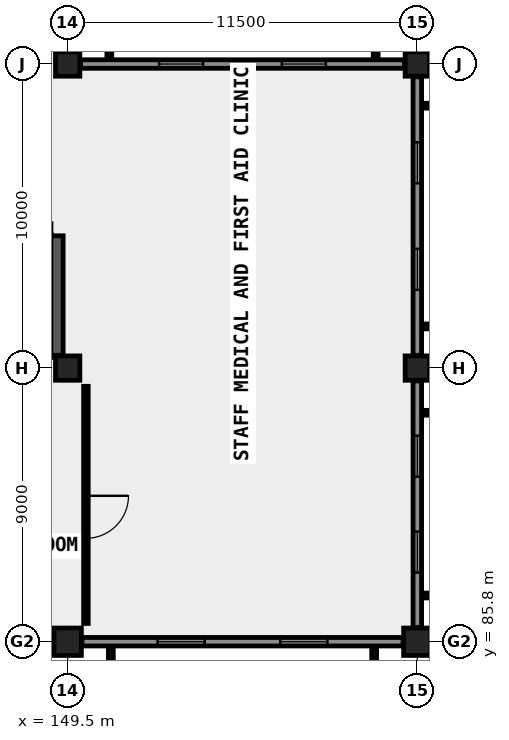
"""IFC4 building model, lengths in metres.
Left out: names, types, materials, properties, quantities, classifications, styles, units other than length and angle.
Written with IfcOpenShell. Run it as: python <this file> out.ifc"""

import sys

from ifc_helpers import new_model, si_unit, direction, frame, frame_2d, origin, origin_2d, place, context, subcontext, project, spatial, rectangle, extrude, element, fill, save


model = new_model("IFC4")
c1 = context("Model", 3, precision=1e-05, world=origin(), true_north=direction((0.0, 1.0)))
c2 = subcontext(c1, "Body", "Model", "MODEL_VIEW")
j1 = project(units=[si_unit("LENGTHUNIT", "METRE"), si_unit("PLANEANGLEUNIT", "RADIAN")], contexts=[c1])
p1 = place(None, origin())
s1 = spatial("IfcSite", under=j1, at=p1, CompositionType="ELEMENT")
p2 = place(p1, origin())
s2 = spatial("IfcBuilding", under=s1, at=p2, CompositionType="ELEMENT")
p3 = place(p2, frame((0.0, 0.0, 18.3)))
s3 = spatial("IfcBuildingStorey", under=s2, at=p3, CompositionType="ELEMENT", Elevation=18.3)
p4 = place(p3, frame((149.5, 85.8, 0.0), z_axis=(0.0, 0.0, 1.0), x_axis=(1.0, 0.0, 0.0)))
e1 = element("IfcColumn", 1, at=p4, inside=s3, PredefinedType="COLUMN", context=c2, shape_type="SweptSolid", body=[
    extrude(rectangle(XDim=0.9, YDim=0.9, at=origin_2d()), origin(), (0.0, 0.0, 1.0), 4.16),
])
for number, where, z_axis, x_axis in (
    (2, (149.5, 94.8, 0.0), (0.0, 0.0, 1.0), (1.0, 0.0, 0.0)),
    (3, (149.5, 104.8, 0.0), (0.0, 0.0, 1.0), (1.0, 0.0, 0.0)),
):
    element("IfcColumn", number, at=place(p3, frame(where, z_axis=z_axis, x_axis=x_axis)), inside=s3, PredefinedType="COLUMN", context=c2, shape_type="SweptSolid", body=[
        extrude(rectangle(XDim=0.8, YDim=0.8, at=origin_2d()), origin(), (0.0, 0.0, 1.0), 4.16),
    ])
p5 = place(p3, frame((161.0, 85.8, 0.0), z_axis=(0.0, 0.0, 1.0), x_axis=(1.0, 0.0, 0.0)))
e4 = element("IfcColumn", 4, at=p5, inside=s3, PredefinedType="COLUMN", context=c2, shape_type="SweptSolid", body=[
    extrude(rectangle(XDim=0.9, YDim=0.9, at=origin_2d()), origin(), (0.0, 0.0, 1.0), 4.16),
])
for number, where, z_axis, x_axis in (
    (5, (161.0, 94.8, 0.0), (0.0, 0.0, 1.0), (1.0, 0.0, 0.0)),
    (6, (161.0, 104.8, 0.0), (0.0, 0.0, 1.0), (1.0, 0.0, 0.0)),
):
    element("IfcColumn", number, at=place(p3, frame(where, z_axis=z_axis, x_axis=x_axis)), inside=s3, PredefinedType="COLUMN", context=c2, shape_type="SweptSolid", body=[
        extrude(rectangle(XDim=0.8, YDim=0.8, at=origin_2d()), origin(), (0.0, 0.0, 1.0), 4.16),
    ])
p6 = place(p3, frame((149.15, 95.22, 0.0), z_axis=(0.0, 0.0, 1.0), x_axis=(0.0, 1.0, 0.0)))
e7 = element("IfcWall", 7, at=p6, inside=s3, PredefinedType="SHEAR", context=c2, shape_type="SweptSolid", body=[
    extrude(rectangle(XDim=3.93, YDim=0.4, at=frame_2d((1.965, 0.0))), origin(), (0.0, 0.0, 1.0), 4.16),
])
p7 = place(p3, frame((148.68, 85.8, 0.0), z_axis=(0.0, 0.0, 1.0), x_axis=(1.0, 0.0, 0.0)))
e8 = element("IfcWall", 8, at=p7, inside=s3, PredefinedType="SOLIDWALL", context=c2, shape_type="SweptSolid", body=[
    extrude(rectangle(XDim=0.35, YDim=0.28, at=frame_2d((0.175, 0.0))), origin(), (0.0, 0.0, 1.0), 3.89),
])
p8 = place(p3, frame((149.97, 85.8, 0.0), z_axis=(0.0, 0.0, 1.0), x_axis=(1.0, 0.0, 0.0)))
e9 = element("IfcWall", 9, at=p8, inside=s3, PredefinedType="SOLIDWALL", context=c2, shape_type="SweptSolid", body=[
    extrude(rectangle(XDim=10.56, YDim=0.28, at=frame_2d((5.28, 0.0))), origin(), (0.0, 0.0, 1.0), 3.1),
])
p9 = place(p8, frame((2.487, 0.0, 0.85)))
e10 = element("IfcOpeningElement", 10, at=p9, cuts=e9, PredefinedType="OPENING", context=c2, shape_type="SweptSolid", body=[
    extrude(rectangle(XDim=1.55, YDim=1.85, at=frame_2d((0.775, 0.925))), frame((0.0, 0.15, 0.0), z_axis=(0.0, -1.0, 0.0), x_axis=(1.0, 0.0, 0.0)), (0.0, 0.0, 1.0), 0.3),
])
p10 = place(p8, frame((6.523, 0.0, 0.85)))
e11 = element("IfcOpeningElement", 11, at=p10, cuts=e9, PredefinedType="OPENING", context=c2, shape_type="SweptSolid", body=[
    extrude(rectangle(XDim=1.55, YDim=1.85, at=frame_2d((0.775, 0.925))), frame((0.0, 0.15, 0.0), z_axis=(0.0, -1.0, 0.0), x_axis=(1.0, 0.0, 0.0)), (0.0, 0.0, 1.0), 0.3),
])
p11 = place(p3, frame((161.0, 86.27, 0.0), z_axis=(0.0, 0.0, 1.0), x_axis=(0.0, 1.0, 0.0)))
e12 = element("IfcWall", 12, at=p11, inside=s3, PredefinedType="SOLIDWALL", context=c2, shape_type="SweptSolid", body=[
    extrude(rectangle(XDim=8.11, YDim=0.28, at=frame_2d((4.055, 0.0))), origin(), (0.0, 0.0, 1.0), 3.1),
])
p12 = place(p11, frame((1.803, 0.0, 0.85)))
e13 = element("IfcOpeningElement", 13, at=p12, cuts=e12, PredefinedType="OPENING", context=c2, shape_type="SweptSolid", body=[
    extrude(rectangle(XDim=1.35, YDim=1.65, at=frame_2d((0.675, 0.825))), frame((0.0, 0.15, 0.0), z_axis=(0.0, -1.0, 0.0), x_axis=(1.0, 0.0, 0.0)), (0.0, 0.0, 1.0), 0.3),
])
p13 = place(p11, frame((4.957, 0.0, 0.85)))
e14 = element("IfcOpeningElement", 14, at=p13, cuts=e12, PredefinedType="OPENING", context=c2, shape_type="SweptSolid", body=[
    extrude(rectangle(XDim=1.35, YDim=1.65, at=frame_2d((0.675, 0.825))), frame((0.0, 0.15, 0.0), z_axis=(0.0, -1.0, 0.0), x_axis=(1.0, 0.0, 0.0)), (0.0, 0.0, 1.0), 0.3),
])
p14 = place(p3, frame((161.0, 95.22, 0.0), z_axis=(0.0, 0.0, 1.0), x_axis=(0.0, 1.0, 0.0)))
e15 = element("IfcWall", 15, at=p14, inside=s3, PredefinedType="SOLIDWALL", context=c2, shape_type="SweptSolid", body=[
    extrude(rectangle(XDim=9.16, YDim=0.28, at=frame_2d((4.58, 0.0))), origin(), (0.0, 0.0, 1.0), 3.1),
])
p15 = place(p14, frame((2.153, 0.0, 0.85)))
e16 = element("IfcOpeningElement", 16, at=p15, cuts=e15, PredefinedType="OPENING", context=c2, shape_type="SweptSolid", body=[
    extrude(rectangle(XDim=1.35, YDim=1.65, at=frame_2d((0.675, 0.825))), frame((0.0, 0.15, 0.0), z_axis=(0.0, -1.0, 0.0), x_axis=(1.0, 0.0, 0.0)), (0.0, 0.0, 1.0), 0.3),
])
p16 = place(p14, frame((5.657, 0.0, 0.85)))
e17 = element("IfcOpeningElement", 17, at=p16, cuts=e15, PredefinedType="OPENING", context=c2, shape_type="SweptSolid", body=[
    extrude(rectangle(XDim=1.35, YDim=1.65, at=frame_2d((0.675, 0.825))), frame((0.0, 0.15, 0.0), z_axis=(0.0, -1.0, 0.0), x_axis=(1.0, 0.0, 0.0)), (0.0, 0.0, 1.0), 0.3),
])
p17 = place(p3, frame((149.92, 104.8, 0.0), z_axis=(0.0, 0.0, 1.0), x_axis=(1.0, 0.0, 0.0)))
e18 = element("IfcWall", 18, at=p17, inside=s3, PredefinedType="SOLIDWALL", context=c2, shape_type="SweptSolid", body=[
    extrude(rectangle(XDim=10.66, YDim=0.28, at=frame_2d((5.33, 0.0))), origin(), (0.0, 0.0, 1.0), 3.1),
])
p18 = place(p17, frame((2.587, 0.0, 0.85)))
e19 = element("IfcOpeningElement", 19, at=p18, cuts=e18, PredefinedType="OPENING", context=c2, shape_type="SweptSolid", body=[
    extrude(rectangle(XDim=1.45, YDim=1.75, at=frame_2d((0.725, 0.875))), frame((0.0, 0.15, 0.0), z_axis=(0.0, -1.0, 0.0), x_axis=(1.0, 0.0, 0.0)), (0.0, 0.0, 1.0), 0.3),
])
p19 = place(p17, frame((6.623, 0.0, 0.85)))
e20 = element("IfcOpeningElement", 20, at=p19, cuts=e18, PredefinedType="OPENING", context=c2, shape_type="SweptSolid", body=[
    extrude(rectangle(XDim=1.45, YDim=1.75, at=frame_2d((0.725, 0.875))), frame((0.0, 0.15, 0.0), z_axis=(0.0, -1.0, 0.0), x_axis=(1.0, 0.0, 0.0)), (0.0, 0.0, 1.0), 0.3),
])
p20 = place(p3, frame((150.1, 86.4, 0.0), z_axis=(0.0, 0.0, 1.0), x_axis=(0.0, 1.0, 0.0)))
e21 = element("IfcWall", 21, at=p20, inside=s3, PredefinedType="PARTITIONING", context=c2, shape_type="SweptSolid", body=[
    extrude(rectangle(XDim=7.8, YDim=0.15, at=frame_2d((3.9, 0.0))), origin(), (0.0, 0.0, 1.0), 3.88),
])
p21 = place(p20, frame((2.8, 0.0, 0.0)))
e22 = element("IfcOpeningElement", 22, at=p21, cuts=e21, PredefinedType="OPENING", context=c2, shape_type="SweptSolid", body=[
    extrude(rectangle(XDim=1.4, YDim=2.15, at=frame_2d((0.7, 1.075))), frame((0.0, 0.085, 0.0), z_axis=(0.0, -1.0, 0.0), x_axis=(1.0, 0.0, 0.0)), (0.0, 0.0, 1.0), 0.17),
])
p22 = place(p9, origin())
e23 = element("IfcWindow", 23, at=p22, inside=s3, PartitioningType="SINGLE_PANEL", PredefinedType="WINDOW", context=c2, shape_type="SweptSolid", body=[
    extrude(rectangle(XDim=1.55, YDim=1.85, at=frame_2d((0.775, 0.925))), frame((0.0, 0.03, 0.0), z_axis=(0.0, -1.0, 0.0), x_axis=(1.0, 0.0, 0.0)), (0.0, 0.0, 1.0), 0.06),
])
fill(e10, e23)
p23 = place(p10, origin())
e24 = element("IfcWindow", 24, at=p23, inside=s3, PartitioningType="SINGLE_PANEL", PredefinedType="WINDOW", context=c2, shape_type="SweptSolid", body=[
    extrude(rectangle(XDim=1.55, YDim=1.85, at=frame_2d((0.775, 0.925))), frame((0.0, 0.03, 0.0), z_axis=(0.0, -1.0, 0.0), x_axis=(1.0, 0.0, 0.0)), (0.0, 0.0, 1.0), 0.06),
])
fill(e11, e24)
p24 = place(p12, origin())
e25 = element("IfcWindow", 25, at=p24, inside=s3, PartitioningType="SINGLE_PANEL", PredefinedType="WINDOW", context=c2, shape_type="SweptSolid", body=[
    extrude(rectangle(XDim=1.35, YDim=1.65, at=frame_2d((0.675, 0.825))), frame((0.0, 0.03, 0.0), z_axis=(0.0, -1.0, 0.0), x_axis=(1.0, 0.0, 0.0)), (0.0, 0.0, 1.0), 0.06),
])
fill(e13, e25)
p25 = place(p13, origin())
e26 = element("IfcWindow", 26, at=p25, inside=s3, PartitioningType="SINGLE_PANEL", PredefinedType="WINDOW", context=c2, shape_type="SweptSolid", body=[
    extrude(rectangle(XDim=1.35, YDim=1.65, at=frame_2d((0.675, 0.825))), frame((0.0, 0.03, 0.0), z_axis=(0.0, -1.0, 0.0), x_axis=(1.0, 0.0, 0.0)), (0.0, 0.0, 1.0), 0.06),
])
fill(e14, e26)
p26 = place(p15, origin())
e27 = element("IfcWindow", 27, at=p26, inside=s3, PartitioningType="SINGLE_PANEL", PredefinedType="WINDOW", context=c2, shape_type="SweptSolid", body=[
    extrude(rectangle(XDim=1.35, YDim=1.65, at=frame_2d((0.675, 0.825))), frame((0.0, 0.03, 0.0), z_axis=(0.0, -1.0, 0.0), x_axis=(1.0, 0.0, 0.0)), (0.0, 0.0, 1.0), 0.06),
])
fill(e16, e27)
p27 = place(p16, origin())
e28 = element("IfcWindow", 28, at=p27, inside=s3, PartitioningType="SINGLE_PANEL", PredefinedType="WINDOW", context=c2, shape_type="SweptSolid", body=[
    extrude(rectangle(XDim=1.35, YDim=1.65, at=frame_2d((0.675, 0.825))), frame((0.0, 0.03, 0.0), z_axis=(0.0, -1.0, 0.0), x_axis=(1.0, 0.0, 0.0)), (0.0, 0.0, 1.0), 0.06),
])
fill(e17, e28)
p28 = place(p18, origin())
e29 = element("IfcWindow", 29, at=p28, inside=s3, PartitioningType="SINGLE_PANEL", PredefinedType="WINDOW", context=c2, shape_type="SweptSolid", body=[
    extrude(rectangle(XDim=1.45, YDim=1.75, at=frame_2d((0.725, 0.875))), frame((0.0, 0.03, 0.0), z_axis=(0.0, -1.0, 0.0), x_axis=(1.0, 0.0, 0.0)), (0.0, 0.0, 1.0), 0.06),
])
fill(e19, e29)
p29 = place(p19, origin())
e30 = element("IfcWindow", 30, at=p29, inside=s3, PartitioningType="SINGLE_PANEL", PredefinedType="WINDOW", context=c2, shape_type="SweptSolid", body=[
    extrude(rectangle(XDim=1.45, YDim=1.75, at=frame_2d((0.725, 0.875))), frame((0.0, 0.03, 0.0), z_axis=(0.0, -1.0, 0.0), x_axis=(1.0, 0.0, 0.0)), (0.0, 0.0, 1.0), 0.06),
])
fill(e20, e30)
p30 = place(p21, origin())
e31 = element("IfcDoor", 31, at=p30, inside=s3, OperationType="SINGLE_SWING_RIGHT", PredefinedType="DOOR", context=c2, shape_type="SweptSolid", body=[
    extrude(rectangle(XDim=1.4, YDim=2.15, at=frame_2d((0.7, 1.075))), frame((0.0, 0.025, 0.0), z_axis=(0.0, -1.0, 0.0), x_axis=(1.0, 0.0, 0.0)), (0.0, 0.0, 1.0), 0.05),
])
fill(e22, e31)
save(model, sys.argv[1])
